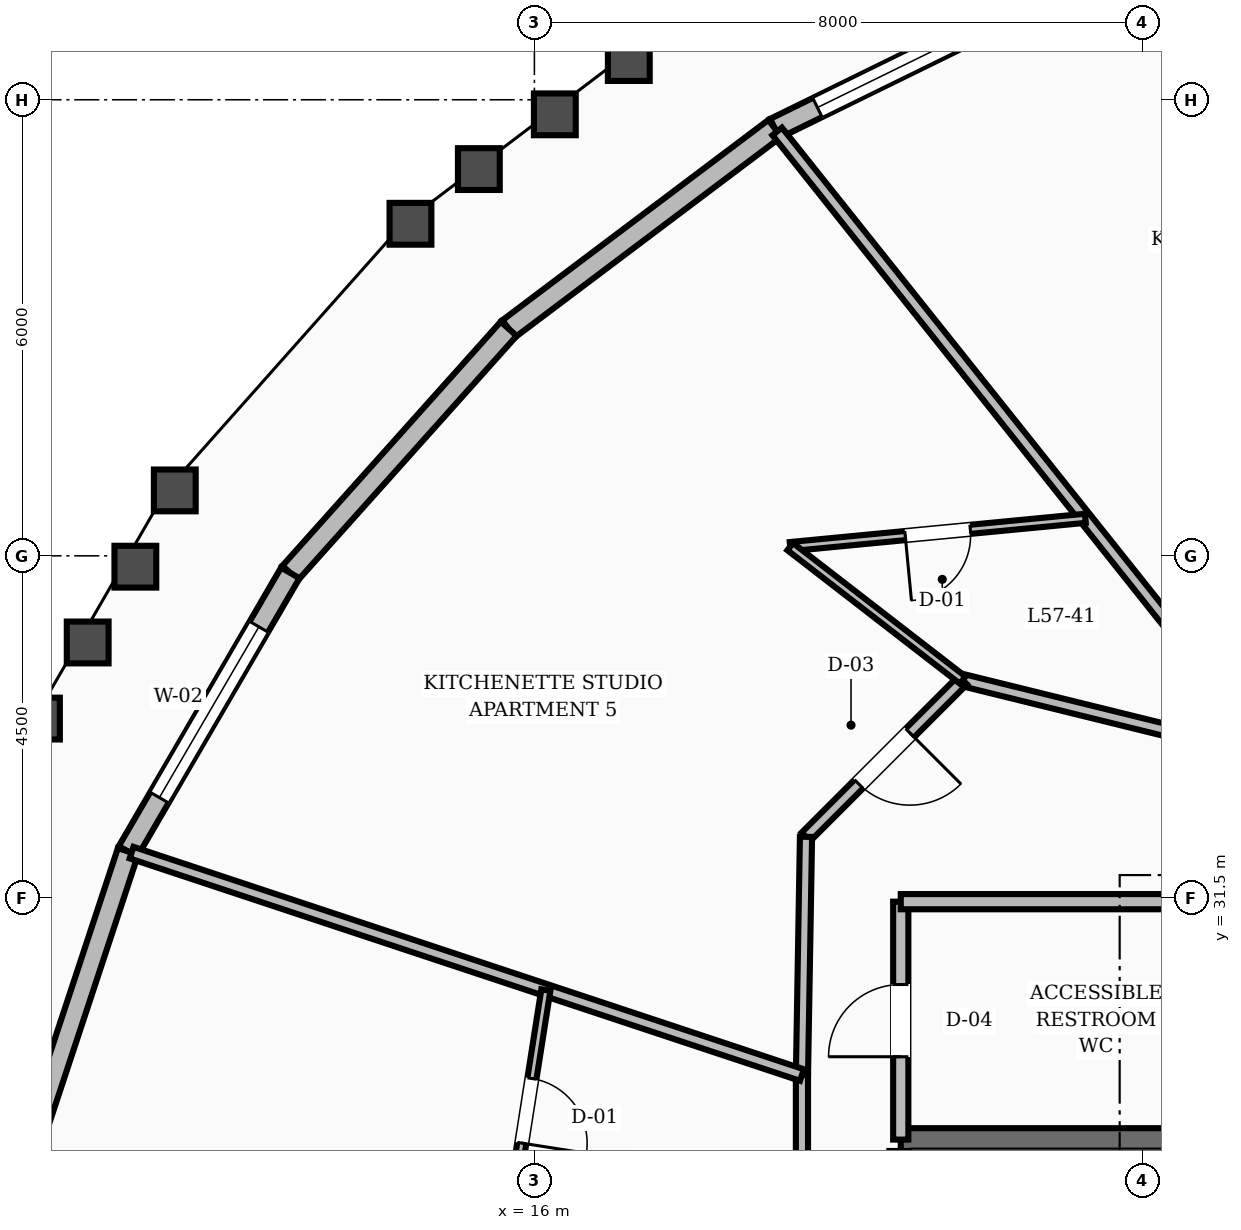
"""IFC4 building model, lengths in metres.
Left out: names, types, materials, properties, quantities, classifications, styles, units other than length and angle.
Written with IfcOpenShell. Run it as: python <this file> out.ifc"""

import sys

from ifc_helpers import new_model, si_unit, direction, frame, frame_2d, origin, place, context, subcontext, project, spatial, rectangle, extrude, element, fill, save


model = new_model("IFC4")
c1 = context("Model", 3, precision=1e-05, world=origin(), true_north=direction((0.0, 1.0)))
c2 = subcontext(c1, "Body", "Model", "MODEL_VIEW")
j1 = project(units=[si_unit("LENGTHUNIT", "METRE"), si_unit("PLANEANGLEUNIT", "RADIAN")], contexts=[c1])
p1 = place(None, origin())
s1 = spatial("IfcSite", under=j1, at=p1, CompositionType="ELEMENT")
p2 = place(p1, origin())
s2 = spatial("IfcBuilding", under=s1, at=p2, CompositionType="ELEMENT")
p3 = place(p2, frame((0.0, 0.0, 222.0)))
s3 = spatial("IfcBuildingStorey", under=s2, at=p3, CompositionType="ELEMENT", Elevation=222.0)
p4 = place(p3, frame((20.82, 19.43, 0.0), z_axis=(0.0, 0.0, 1.0), x_axis=(0.0, 1.0, 0.0)))
e1 = element("IfcWall", 1, at=p4, inside=s3, PredefinedType="SHEAR", context=c2, shape_type="SweptSolid", body=[
    extrude(rectangle(XDim=8.74, YDim=0.3, at=frame_2d((4.37, 0.0))), origin(), (0.0, 0.0, 1.0), 3.6),
])
p5 = place(p3, frame((20.82, 28.32, 0.0), z_axis=(0.0, 0.0, 1.0), x_axis=(1.0, 0.0, 0.0)))
e2 = element("IfcWall", 2, at=p5, inside=s3, PredefinedType="SHEAR", context=c2, shape_type="SweptSolid", body=[
    extrude(rectangle(XDim=3.6, YDim=0.3, at=frame_2d((1.8, 0.0))), origin(), (0.0, 0.0, 1.0), 3.6),
])
p6 = place(p3, frame((23.158, 43.581, 0.0), z_axis=(0.0, 0.0, 1.0), x_axis=(-0.897868409718, -0.440263919519, 0.0)))
e3 = element("IfcWall", 3, at=p6, inside=s3, PredefinedType="STANDARD", context=c2, shape_type="SweptSolid", body=[
    extrude(rectangle(XDim=4.449, YDim=0.28, at=frame_2d((2.225, 0.0))), origin(), (0.0, 0.0, 1.0), 2.88),
])
p7 = place(p6, frame((0.625, 0.0, 0.8)))
e4 = element("IfcOpeningElement", 4, at=p7, cuts=e3, PredefinedType="OPENING", context=c2, shape_type="SweptSolid", body=[
    extrude(rectangle(XDim=3.2, YDim=1.65, at=frame_2d((1.6, 0.825))), frame((0.0, 0.15, 0.0), z_axis=(0.0, -1.0, 0.0), x_axis=(1.0, 0.0, 0.0)), (0.0, 0.0, 1.0), 0.3),
])
p8 = place(p3, frame((19.163, 41.623, 0.0), z_axis=(0.0, 0.0, 1.0), x_axis=(-0.798942565337, -0.601407330594, 0.0)))
e5 = element("IfcWall", 5, at=p8, inside=s3, PredefinedType="STANDARD", context=c2, shape_type="SweptSolid", body=[
    extrude(rectangle(XDim=4.383, YDim=0.28, at=frame_2d((2.191, 0.0))), origin(), (0.0, 0.0, 1.0), 2.88),
])
p9 = place(p3, frame((15.662, 38.987, 0.0), z_axis=(0.0, 0.0, 1.0), x_axis=(-0.666726962521, -0.745302057858, 0.0)))
e6 = element("IfcWall", 6, at=p9, inside=s3, PredefinedType="STANDARD", context=c2, shape_type="SweptSolid", body=[
    extrude(rectangle(XDim=4.31, YDim=0.28, at=frame_2d((2.155, 0.0))), origin(), (0.0, 0.0, 1.0), 2.88),
])
p10 = place(p3, frame((12.789, 35.775, 0.0), z_axis=(0.0, 0.0, 1.0), x_axis=(-0.503498718903, -0.863995972249, 0.0)))
e7 = element("IfcWall", 7, at=p10, inside=s3, PredefinedType="STANDARD", context=c2, shape_type="SweptSolid", body=[
    extrude(rectangle(XDim=4.241, YDim=0.28, at=frame_2d((2.12, 0.0))), origin(), (0.0, 0.0, 1.0), 2.88),
])
p11 = place(p10, frame((0.821, 0.0, 0.8)))
e8 = element("IfcOpeningElement", 8, at=p11, cuts=e7, PredefinedType="OPENING", context=c2, shape_type="SweptSolid", body=[
    extrude(rectangle(XDim=2.6, YDim=1.65, at=frame_2d((1.3, 0.825))), frame((0.0, 0.15, 0.0), z_axis=(0.0, -1.0, 0.0), x_axis=(1.0, 0.0, 0.0)), (0.0, 0.0, 1.0), 0.3),
])
p12 = place(p3, frame((10.653, 32.111, 0.0), z_axis=(0.0, 0.0, 1.0), x_axis=(-0.313988276285, -0.949426859929, 0.0)))
e9 = element("IfcWall", 9, at=p12, inside=s3, PredefinedType="STANDARD", context=c2, shape_type="SweptSolid", body=[
    extrude(rectangle(XDim=4.188, YDim=0.28, at=frame_2d((2.094, 0.0))), origin(), (0.0, 0.0, 1.0), 2.88),
])
p13 = place(p3, frame((20.82, 28.32, 0.0), z_axis=(0.0, 0.0, 1.0), x_axis=(0.0, 1.0, 0.0)))
e10 = element("IfcWall", 10, at=p13, inside=s3, PredefinedType="SOLIDWALL", context=c2, shape_type="SweptSolid", body=[
    extrude(rectangle(XDim=3.13, YDim=0.2, at=frame_2d((1.565, 0.0))), origin(), (0.0, 0.0, 1.0), 2.87),
])
p14 = place(p13, frame((1.09, 0.0, 0.0)))
e11 = element("IfcOpeningElement", 11, at=p14, cuts=e10, PredefinedType="OPENING", context=c2, shape_type="SweptSolid", body=[
    extrude(rectangle(XDim=0.95, YDim=2.1, at=frame_2d((0.475, 1.05))), frame((0.0, 0.11, 0.0), z_axis=(0.0, -1.0, 0.0), x_axis=(1.0, 0.0, 0.0)), (0.0, 0.0, 1.0), 0.22),
])
p15 = place(p3, frame((20.82, 31.45, 0.0), z_axis=(0.0, 0.0, 1.0), x_axis=(1.0, 0.0, 0.0)))
e12 = element("IfcWall", 12, at=p15, inside=s3, PredefinedType="SOLIDWALL", context=c2, shape_type="SweptSolid", body=[
    extrude(rectangle(XDim=3.98, YDim=0.2, at=frame_2d((1.99, 0.0))), origin(), (0.0, 0.0, 1.0), 2.87),
])
p16 = place(p3, frame((25.752, 33.35, 0.0), z_axis=(0.0, 0.0, 1.0), x_axis=(-0.970939799552, 0.239323850978, 0.0)))
e13 = element("IfcWall", 13, at=p16, inside=s3, PredefinedType="SOLIDWALL", context=c2, shape_type="SweptSolid", body=[
    extrude(rectangle(XDim=4.241, YDim=0.16, at=frame_2d((2.12, 0.0))), origin(), (0.0, 0.0, 1.0), 2.87),
])
p17 = place(p3, frame((21.635, 34.365, 0.0), z_axis=(0.0, 0.0, 1.0), x_axis=(-0.707106781187, -0.707106781187, 0.0)))
e14 = element("IfcWall", 14, at=p17, inside=s3, PredefinedType="SOLIDWALL", context=c2, shape_type="SweptSolid", body=[
    extrude(rectangle(XDim=2.916, YDim=0.16, at=frame_2d((1.458, 0.0))), origin(), (0.0, 0.0, 1.0), 2.87),
])
p18 = place(p17, frame((0.983, 0.0, 0.0)))
e15 = element("IfcOpeningElement", 15, at=p18, cuts=e14, PredefinedType="OPENING", context=c2, shape_type="SweptSolid", body=[
    extrude(rectangle(XDim=0.95, YDim=2.1, at=frame_2d((0.475, 1.05))), frame((0.0, 0.09, 0.0), z_axis=(0.0, -1.0, 0.0), x_axis=(1.0, 0.0, 0.0)), (0.0, 0.0, 1.0), 0.18),
])
p19 = place(p3, frame((19.573, 32.303, 0.0), z_axis=(0.0, 0.0, 1.0), x_axis=(-0.016981035134, -0.999855811828, 0.0)))
e16 = element("IfcWall", 16, at=p19, inside=s3, PredefinedType="SOLIDWALL", context=c2, shape_type="SweptSolid", body=[
    extrude(rectangle(XDim=3.134, YDim=0.16, at=frame_2d((1.567, 0.0))), origin(), (0.0, 0.0, 1.0), 2.87),
])
p20 = place(p3, frame((19.52, 29.169, 0.0), z_axis=(0.0, 0.0, 1.0), x_axis=(0.0, -1.0, 0.0)))
e17 = element("IfcWall", 17, at=p20, inside=s3, PredefinedType="SOLIDWALL", context=c2, shape_type="SweptSolid", body=[
    extrude(rectangle(XDim=2.687, YDim=0.16, at=frame_2d((1.344, 0.0))), origin(), (0.0, 0.0, 1.0), 2.87),
])
p21 = place(p3, frame((25.752, 33.35, 0.0), z_axis=(0.0, 0.0, 1.0), x_axis=(-0.623021929745, 0.782204369112, 0.0)))
e18 = element("IfcWall", 18, at=p21, inside=s3, PredefinedType="SOLIDWALL", context=c2, shape_type="SweptSolid", body=[
    extrude(rectangle(XDim=10.526, YDim=0.16, at=frame_2d((5.263, 0.0))), origin(), (0.0, 0.0, 1.0), 2.87),
])
p22 = place(p3, frame((23.249, 36.494, 0.0), z_axis=(0.0, 0.0, 1.0), x_axis=(-0.995435363516, -0.095438132111, 0.0)))
e19 = element("IfcWall", 19, at=p22, inside=s3, PredefinedType="PARTITIONING", context=c2, shape_type="SweptSolid", body=[
    extrude(rectangle(XDim=3.901, YDim=0.12, at=frame_2d((1.951, 0.0))), origin(), (0.0, 0.0, 1.0), 2.87),
])
p23 = place(p22, frame((1.521, 0.0, 0.0)))
e20 = element("IfcOpeningElement", 20, at=p23, cuts=e19, PredefinedType="OPENING", context=c2, shape_type="SweptSolid", body=[
    extrude(rectangle(XDim=0.86, YDim=2.1, at=frame_2d((0.43, 1.05))), frame((0.0, 0.07, 0.0), z_axis=(0.0, -1.0, 0.0), x_axis=(1.0, 0.0, 0.0)), (0.0, 0.0, 1.0), 0.14),
])
p24 = place(p3, frame((21.635, 34.365, 0.0), z_axis=(0.0, 0.0, 1.0), x_axis=(-0.790875111812, 0.61197757926, 0.0)))
e21 = element("IfcWall", 21, at=p24, inside=s3, PredefinedType="PARTITIONING", context=c2, shape_type="SweptSolid", body=[
    extrude(rectangle(XDim=2.87, YDim=0.12, at=frame_2d((1.435, 0.0))), origin(), (0.0, 0.0, 1.0), 2.87),
])
p25 = place(p3, frame((19.52, 29.169, 0.0), z_axis=(0.0, 0.0, 1.0), x_axis=(-0.949134247943, 0.314871687171, 0.0)))
e22 = element("IfcWall", 22, at=p25, inside=s3, PredefinedType="SOLIDWALL", context=c2, shape_type="SweptSolid", body=[
    extrude(rectangle(XDim=9.292, YDim=0.16, at=frame_2d((4.646, 0.0))), origin(), (0.0, 0.0, 1.0), 2.87),
])
p26 = place(p3, frame((16.151, 30.287, 0.0), z_axis=(0.0, 0.0, 1.0), x_axis=(-0.15540506101, -0.987850832369, 0.0)))
e23 = element("IfcWall", 23, at=p26, inside=s3, PredefinedType="PARTITIONING", context=c2, shape_type="SweptSolid", body=[
    extrude(rectangle(XDim=3.216, YDim=0.12, at=frame_2d((1.608, 0.0))), origin(), (0.0, 0.0, 1.0), 2.87),
])
p27 = place(p26, frame((1.178, 0.0, 0.0)))
e24 = element("IfcOpeningElement", 24, at=p27, cuts=e23, PredefinedType="OPENING", context=c2, shape_type="SweptSolid", body=[
    extrude(rectangle(XDim=0.86, YDim=2.1, at=frame_2d((0.43, 1.05))), frame((0.0, 0.07, 0.0), z_axis=(0.0, -1.0, 0.0), x_axis=(1.0, 0.0, 0.0)), (0.0, 0.0, 1.0), 0.14),
])
p28 = place(p7, origin())
e25 = element("IfcWindow", 25, at=p28, inside=s3, PartitioningType="SINGLE_PANEL", PredefinedType="WINDOW", context=c2, shape_type="SweptSolid", body=[
    extrude(rectangle(XDim=3.2, YDim=1.65, at=frame_2d((1.6, 0.825))), frame((0.0, 0.03, 0.0), z_axis=(0.0, -1.0, 0.0), x_axis=(1.0, 0.0, 0.0)), (0.0, 0.0, 1.0), 0.06),
])
fill(e4, e25)
p29 = place(p11, origin())
e26 = element("IfcWindow", 26, at=p29, inside=s3, PartitioningType="SINGLE_PANEL", PredefinedType="WINDOW", context=c2, shape_type="SweptSolid", body=[
    extrude(rectangle(XDim=2.6, YDim=1.65, at=frame_2d((1.3, 0.825))), frame((0.0, 0.03, 0.0), z_axis=(0.0, -1.0, 0.0), x_axis=(1.0, 0.0, 0.0)), (0.0, 0.0, 1.0), 0.06),
])
fill(e8, e26)
p30 = place(p14, origin())
e27 = element("IfcDoor", 27, at=p30, inside=s3, OperationType="SINGLE_SWING_LEFT", PredefinedType="DOOR", context=c2, shape_type="SweptSolid", body=[
    extrude(rectangle(XDim=0.95, YDim=2.1, at=frame_2d((0.475, 1.05))), frame((0.0, 0.025, 0.0), z_axis=(0.0, -1.0, 0.0), x_axis=(1.0, 0.0, 0.0)), (0.0, 0.0, 1.0), 0.05),
])
fill(e11, e27)
p31 = place(p23, origin())
e28 = element("IfcDoor", 28, at=p31, inside=s3, OperationType="SINGLE_SWING_RIGHT", PredefinedType="DOOR", context=c2, shape_type="SweptSolid", body=[
    extrude(rectangle(XDim=0.86, YDim=2.1, at=frame_2d((0.43, 1.05))), frame((0.0, 0.025, 0.0), z_axis=(0.0, -1.0, 0.0), x_axis=(1.0, 0.0, 0.0)), (0.0, 0.0, 1.0), 0.05),
])
fill(e20, e28)
p32 = place(p18, origin())
e29 = element("IfcDoor", 29, at=p32, inside=s3, OperationType="SINGLE_SWING_LEFT", PredefinedType="DOOR", context=c2, shape_type="SweptSolid", body=[
    extrude(rectangle(XDim=0.95, YDim=2.1, at=frame_2d((0.475, 1.05))), frame((0.0, 0.025, 0.0), z_axis=(0.0, -1.0, 0.0), x_axis=(1.0, 0.0, 0.0)), (0.0, 0.0, 1.0), 0.05),
])
fill(e15, e29)
p33 = place(p27, origin())
e30 = element("IfcDoor", 30, at=p33, inside=s3, OperationType="SINGLE_SWING_RIGHT", PredefinedType="DOOR", context=c2, shape_type="SweptSolid", body=[
    extrude(rectangle(XDim=0.86, YDim=2.1, at=frame_2d((0.43, 1.05))), frame((0.0, 0.025, 0.0), z_axis=(0.0, -1.0, 0.0), x_axis=(1.0, 0.0, 0.0)), (0.0, 0.0, 1.0), 0.05),
])
fill(e24, e30)
save(model, sys.argv[1])
